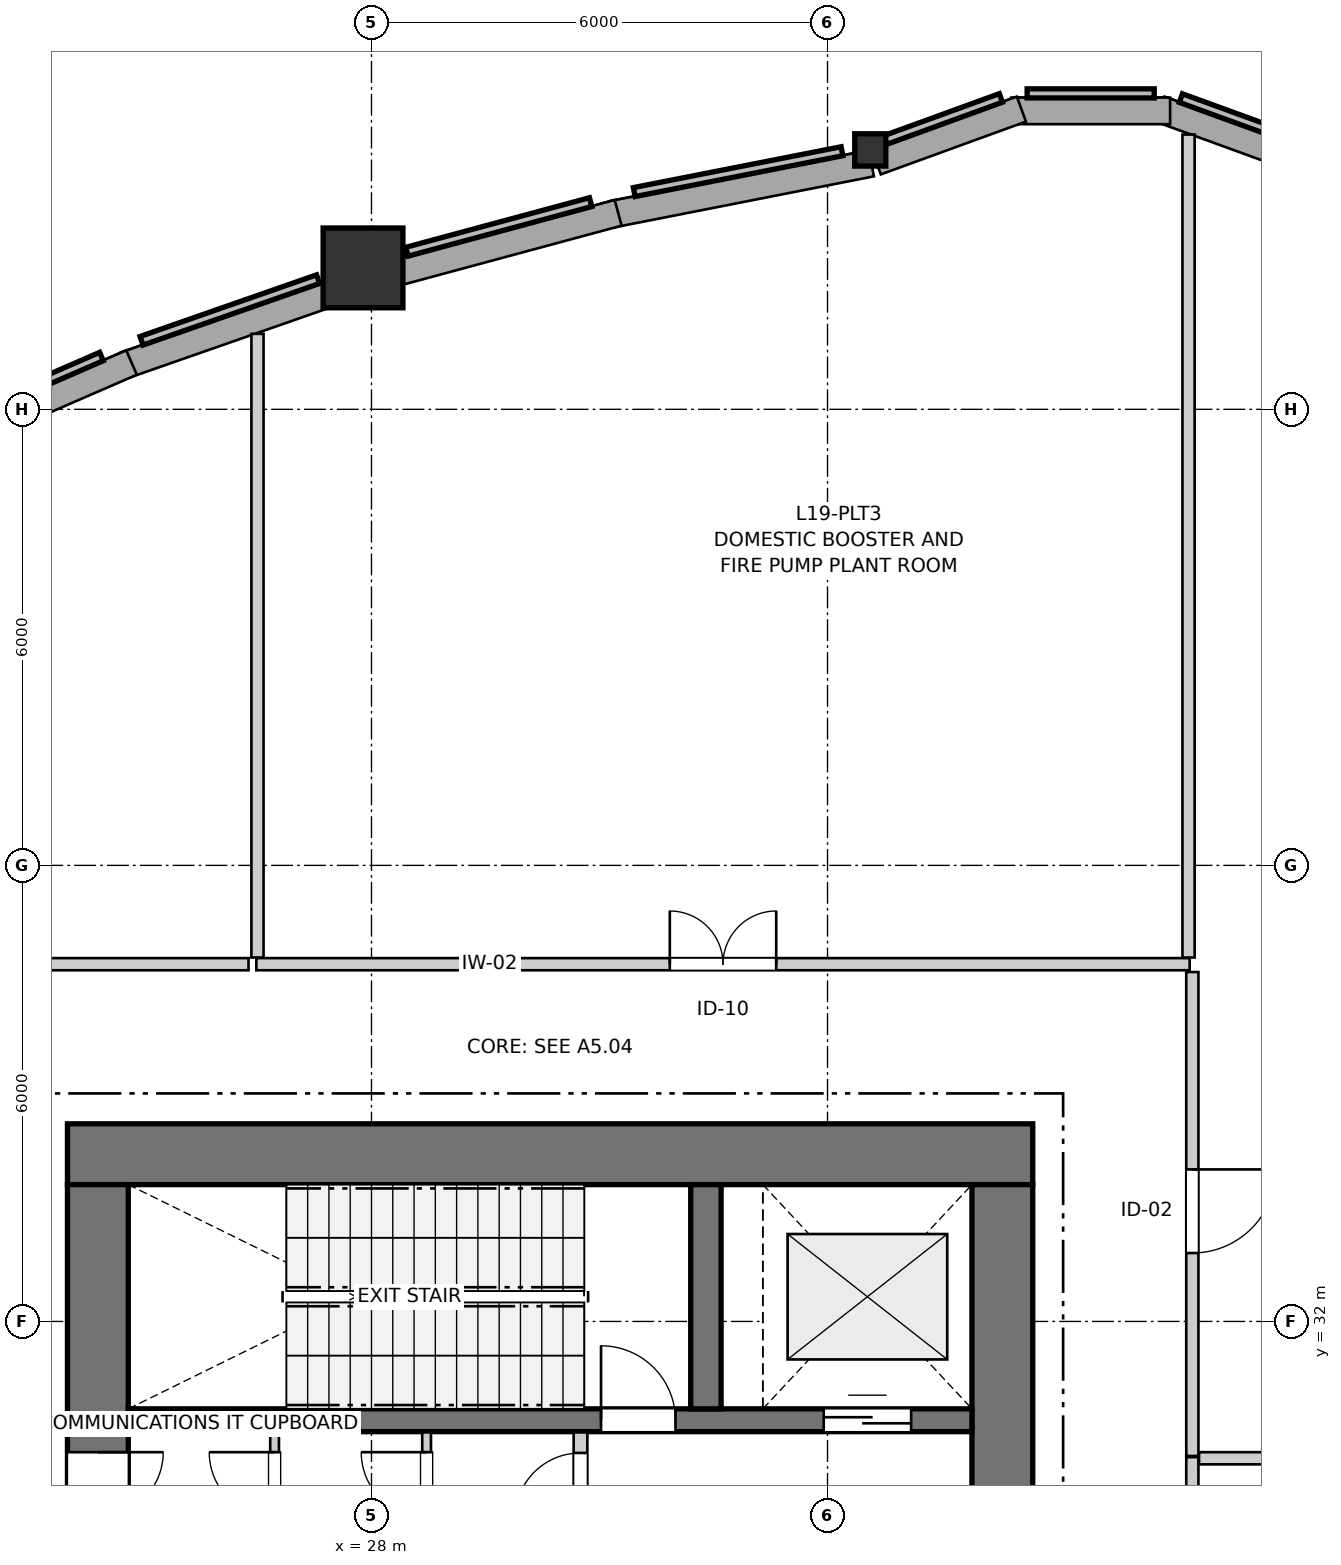
"""IFC4 building model, lengths in metres.
Left out: names, types, materials, properties, quantities, classifications, styles, units other than length and angle.
Written with IfcOpenShell. Run it as: python <this file> out.ifc"""

import sys

from ifc_helpers import new_model, si_unit, direction, frame, frame_2d, origin, origin_2d, place, context, subcontext, project, spatial, rectangle, i_section, extrude, source, transform, mapped, element, fill, save


model = new_model("IFC4")
c1 = context("Model", 3, precision=1e-05, world=origin(), true_north=direction((0.0, 1.0)))
c2 = subcontext(c1, "Body", "Model", "MODEL_VIEW")
j1 = project(units=[si_unit("LENGTHUNIT", "METRE"), si_unit("PLANEANGLEUNIT", "RADIAN")], contexts=[c1])
p1 = place(None, origin())
s1 = spatial("IfcSite", under=j1, at=p1, CompositionType="ELEMENT")
p2 = place(p1, origin())
s2 = spatial("IfcBuilding", under=s1, at=p2, CompositionType="ELEMENT")
p3 = place(p2, frame((0.0, 0.0, 65.4)))
s3 = spatial("IfcBuildingStorey", under=s2, at=p3, CompositionType="ELEMENT", Elevation=65.4)
p4 = place(p3, frame((36.7, 34.2, 0.0), z_axis=(0.0, 0.0, 1.0), x_axis=(-1.0, 0.0, 0.0)))
e1 = element("IfcWall", 1, at=p4, inside=s3, PredefinedType="SHEAR", context=c2, shape_type="SweptSolid", body=[
    extrude(rectangle(XDim=12.7, YDim=0.8, at=frame_2d((6.35, 0.0))), origin(), (0.0, 0.0, 1.0), 4.75),
])
p5 = place(p3, frame((24.4, 33.8, 0.0), z_axis=(0.0, 0.0, 1.0), x_axis=(0.0, -1.0, 0.0)))
e2 = element("IfcWall", 2, at=p5, inside=s3, PredefinedType="SHEAR", context=c2, shape_type="SweptSolid", body=[
    extrude(rectangle(XDim=15.6, YDim=0.8, at=frame_2d((7.8, 0.0))), origin(), (0.0, 0.0, 1.0), 4.75),
])
p6 = place(p5, frame((7.05, 0.0, 0.0)))
e3 = element("IfcOpeningElement", 3, at=p6, cuts=e2, PredefinedType="OPENING", context=c2, shape_type="SweptSolid", body=[
    extrude(rectangle(XDim=1.5, YDim=2.15, at=frame_2d((0.75, 1.075))), frame((0.0, 0.41, 0.0), z_axis=(0.0, -1.0, 0.0), x_axis=(1.0, 0.0, 0.0)), (0.0, 0.0, 1.0), 0.82),
])
p7 = place(p5, frame((3.52, 0.0, 0.0)))
e4 = element("IfcOpeningElement", 4, at=p7, cuts=e2, PredefinedType="OPENING", context=c2, shape_type="SweptSolid", body=[
    extrude(rectangle(XDim=0.86, YDim=2.05, at=frame_2d((0.43, 1.025))), frame((0.0, 0.41, 0.0), z_axis=(0.0, -1.0, 0.0), x_axis=(1.0, 0.0, 0.0)), (0.0, 0.0, 1.0), 0.82),
])
p8 = place(p5, frame((11.22, 0.0, 0.0)))
e5 = element("IfcOpeningElement", 5, at=p8, cuts=e2, PredefinedType="OPENING", context=c2, shape_type="SweptSolid", body=[
    extrude(rectangle(XDim=0.86, YDim=2.05, at=frame_2d((0.43, 1.025))), frame((0.0, 0.41, 0.0), z_axis=(0.0, -1.0, 0.0), x_axis=(1.0, 0.0, 0.0)), (0.0, 0.0, 1.0), 0.82),
])
p9 = place(p3, frame((36.3, 18.2, 0.0), z_axis=(0.0, 0.0, 1.0), x_axis=(0.0, 1.0, 0.0)))
e6 = element("IfcWall", 6, at=p9, inside=s3, PredefinedType="SHEAR", context=c2, shape_type="SweptSolid", body=[
    extrude(rectangle(XDim=15.6, YDim=0.8, at=frame_2d((7.8, 0.0))), origin(), (0.0, 0.0, 1.0), 4.75),
])
p10 = place(p9, frame((4.25, 0.0, 0.0)))
e7 = element("IfcOpeningElement", 7, at=p10, cuts=e6, PredefinedType="OPENING", context=c2, shape_type="SweptSolid", body=[
    extrude(rectangle(XDim=1.1, YDim=2.15, at=frame_2d((0.55, 1.075))), frame((0.0, 0.41, 0.0), z_axis=(0.0, -1.0, 0.0), x_axis=(1.0, 0.0, 0.0)), (0.0, 0.0, 1.0), 0.82),
])
p11 = place(p9, frame((10.25, 0.0, 0.0)))
e8 = element("IfcOpeningElement", 8, at=p11, cuts=e6, PredefinedType="OPENING", context=c2, shape_type="SweptSolid", body=[
    extrude(rectangle(XDim=1.1, YDim=2.15, at=frame_2d((0.55, 1.075))), frame((0.0, 0.41, 0.0), z_axis=(0.0, -1.0, 0.0), x_axis=(1.0, 0.0, 0.0)), (0.0, 0.0, 1.0), 0.82),
])
p12 = place(p3, frame((24.8, 30.7, 0.0), z_axis=(0.0, 0.0, 1.0), x_axis=(1.0, 0.0, 0.0)))
e9 = element("IfcWall", 9, at=p12, inside=s3, PredefinedType="SHEAR", context=c2, shape_type="SweptSolid", body=[
    extrude(rectangle(XDim=11.1, YDim=0.3, at=frame_2d((5.55, 0.0))), origin(), (0.0, 0.0, 1.0), 4.75),
])
p13 = place(p12, frame((6.22, 0.0, 0.0)))
e10 = element("IfcOpeningElement", 10, at=p13, cuts=e9, PredefinedType="OPENING", context=c2, shape_type="SweptSolid", body=[
    extrude(rectangle(XDim=0.98, YDim=2.15, at=frame_2d((0.49, 1.075))), frame((0.0, 0.16, 0.0), z_axis=(0.0, -1.0, 0.0), x_axis=(1.0, 0.0, 0.0)), (0.0, 0.0, 1.0), 0.32),
])
p14 = place(p12, frame((9.15, 0.0, 0.0)))
e11 = element("IfcOpeningElement", 11, at=p14, cuts=e9, PredefinedType="OPENING", context=c2, shape_type="SweptSolid", body=[
    extrude(rectangle(XDim=1.15, YDim=2.15, at=frame_2d((0.575, 1.075))), frame((0.0, 0.16, 0.0), z_axis=(0.0, -1.0, 0.0), x_axis=(1.0, 0.0, 0.0)), (0.0, 0.0, 1.0), 0.32),
])
p15 = place(p3, frame((32.4, 30.85, 0.0), z_axis=(0.0, 0.0, 1.0), x_axis=(0.0, 1.0, 0.0)))
e12 = element("IfcWall", 12, at=p15, inside=s3, PredefinedType="SHEAR", context=c2, shape_type="SweptSolid", body=[
    extrude(rectangle(XDim=2.95, YDim=0.4, at=frame_2d((1.475, 0.0))), origin(), (0.0, 0.0, 1.0), 4.75),
])
m1 = source(origin(), c2, "Body", "SweptSolid", [
    extrude(i_section(OverallWidth=0.409, OverallDepth=0.425, WebThickness=0.03, FlangeThickness=0.048, FilletRadius=0.015, at=origin_2d()), origin(), (0.0, 0.0, 1.0), 4.75),
])
p16 = place(p3, frame((34.562, 47.413, 0.0), z_axis=(0.0, 0.0, 1.0), x_axis=(1.0, 0.0, 0.0)))
e13 = element("IfcColumn", 13, at=p16, inside=s3, PredefinedType="PILASTER", context=c2, shape_type="MappedRepresentation", body=[
    mapped(m1, transform((0.0, 0.0, 0.0), x_axis=(1.0, 0.0, 0.0), y_axis=(0.0, 1.0, 0.0), z_axis=(0.0, 0.0, 1.0), scale=1.0)),
])
m2 = source(origin(), c2, "Body", "SweptSolid", [
    extrude(rectangle(XDim=1.05, YDim=1.05, at=origin_2d()), origin(), (0.0, 0.0, 1.0), 4.75),
])
p17 = place(p3, frame((27.888, 45.861, 0.0), z_axis=(0.0, 0.0, 1.0), x_axis=(1.0, 0.0, 0.0)))
e14 = element("IfcColumn", 14, at=p17, inside=s3, PredefinedType="COLUMN", context=c2, shape_type="MappedRepresentation", body=[
    mapped(m2, transform((0.0, 0.0, 0.0), x_axis=(1.0, 0.0, 0.0), y_axis=(0.0, 1.0, 0.0), z_axis=(0.0, 0.0, 1.0), scale=1.0)),
])
p18 = place(p3, frame((40.338, 47.235, 0.0), z_axis=(0.0, 0.0, 1.0), x_axis=(-0.939711556618, 0.341968113072, 0.0)))
e15 = element("IfcWall", 15, at=p18, inside=s3, PredefinedType="SOLIDWALL", context=c2, shape_type="SweptSolid", body=[
    extrude(rectangle(XDim=2.09, YDim=0.35, at=frame_2d((1.045, 0.0))), origin(), (0.0, 0.0, 1.0), 4.23),
])
p19 = place(p3, frame((38.508, 47.927, 0.0), z_axis=(0.0, 0.0, 1.0), x_axis=(-1.0, 0.0, 0.0)))
e16 = element("IfcWall", 16, at=p19, inside=s3, PredefinedType="SOLIDWALL", context=c2, shape_type="SweptSolid", body=[
    extrude(rectangle(XDim=2.091, YDim=0.35, at=frame_2d((1.045, 0.0))), origin(), (0.0, 0.0, 1.0), 4.23),
])
p20 = place(p3, frame((36.551, 47.95, 0.0), z_axis=(0.0, 0.0, 1.0), x_axis=(-0.939691662178, -0.342022777067, 0.0)))
e17 = element("IfcWall", 17, at=p20, inside=s3, PredefinedType="SOLIDWALL", context=c2, shape_type="SweptSolid", body=[
    extrude(rectangle(XDim=2.032, YDim=0.35, at=frame_2d((1.016, 0.0))), origin(), (0.0, 0.0, 1.0), 4.23),
])
p21 = place(p3, frame((34.577, 47.237, 0.0), z_axis=(0.0, 0.0, 1.0), x_axis=(-0.981238400755, -0.192798342532, 0.0)))
e18 = element("IfcWall", 18, at=p21, inside=s3, PredefinedType="SOLIDWALL", context=c2, shape_type="SweptSolid", body=[
    extrude(rectangle(XDim=3.482, YDim=0.35, at=frame_2d((1.741, 0.0))), origin(), (0.0, 0.0, 1.0), 4.23),
])
p22 = place(p3, frame((31.246, 46.585, 0.0), z_axis=(0.0, 0.0, 1.0), x_axis=(-0.965469506164, -0.260516089076, 0.0)))
e19 = element("IfcWall", 19, at=p22, inside=s3, PredefinedType="SOLIDWALL", context=c2, shape_type="SweptSolid", body=[
    extrude(rectangle(XDim=3.13, YDim=0.35, at=frame_2d((1.565, 0.0))), origin(), (0.0, 0.0, 1.0), 4.23),
])
p23 = place(p3, frame((27.663, 45.596, 0.0), z_axis=(0.0, 0.0, 1.0), x_axis=(-0.944134113087, -0.329561491236, 0.0)))
e20 = element("IfcWall", 20, at=p23, inside=s3, PredefinedType="SOLIDWALL", context=c2, shape_type="SweptSolid", body=[
    extrude(rectangle(XDim=3.074, YDim=0.35, at=frame_2d((1.537, 0.0))), origin(), (0.0, 0.0, 1.0), 4.23),
])
p24 = place(p3, frame((24.843, 44.615, 0.0), z_axis=(0.0, 0.0, 1.0), x_axis=(-0.917119193404, -0.398613076918, 0.0)))
e21 = element("IfcWall", 21, at=p24, inside=s3, PredefinedType="SOLIDWALL", context=c2, shape_type="SweptSolid", body=[
    extrude(rectangle(XDim=3.317, YDim=0.35, at=frame_2d((1.659, 0.0))), origin(), (0.0, 0.0, 1.0), 4.23),
])
p25 = place(p3, frame((30.75, 27.43, 0.0), z_axis=(0.0, 0.0, 1.0), x_axis=(0.0, 1.0, 0.0)))
e22 = element("IfcWall", 22, at=p25, inside=s3, PredefinedType="PARTITIONING", context=c2, shape_type="SweptSolid", body=[
    extrude(rectangle(XDim=3.11, YDim=0.18, at=frame_2d((1.555, 0.0))), origin(), (0.0, 0.0, 1.0), 4.75),
])
p26 = place(p25, frame((1.98, 0.0, 0.0)))
e23 = element("IfcOpeningElement", 23, at=p26, cuts=e22, PredefinedType="OPENING", context=c2, shape_type="SweptSolid", body=[
    extrude(rectangle(XDim=0.86, YDim=2.05, at=frame_2d((0.43, 1.025))), frame((0.0, 0.1, 0.0), z_axis=(0.0, -1.0, 0.0), x_axis=(1.0, 0.0, 0.0)), (0.0, 0.0, 1.0), 0.2),
])
p27 = place(p3, frame((26.725, 29.16, 0.0), z_axis=(0.0, 0.0, 1.0), x_axis=(0.0, 1.0, 0.0)))
e24 = element("IfcWall", 24, at=p27, inside=s3, PredefinedType="PARTITIONING", context=c2, shape_type="SweptSolid", body=[
    extrude(rectangle(XDim=1.38, YDim=0.115, at=frame_2d((0.69, 0.0))), origin(), (0.0, 0.0, 1.0), 4.75),
])
p28 = place(p27, frame((0.26, 0.0, 0.0)))
e25 = element("IfcOpeningElement", 25, at=p28, cuts=e24, PredefinedType="OPENING", context=c2, shape_type="SweptSolid", body=[
    extrude(rectangle(XDim=0.86, YDim=2.05, at=frame_2d((0.43, 1.025))), frame((0.0, 0.067, 0.0), z_axis=(0.0, -1.0, 0.0), x_axis=(1.0, 0.0, 0.0)), (0.0, 0.0, 1.0), 0.135),
])
p29 = place(p3, frame((28.725, 29.16, 0.0), z_axis=(0.0, 0.0, 1.0), x_axis=(0.0, 1.0, 0.0)))
e26 = element("IfcWall", 26, at=p29, inside=s3, PredefinedType="PARTITIONING", context=c2, shape_type="SweptSolid", body=[
    extrude(rectangle(XDim=1.38, YDim=0.115, at=frame_2d((0.69, 0.0))), origin(), (0.0, 0.0, 1.0), 4.75),
])
p30 = place(p29, frame((0.26, 0.0, 0.0)))
e27 = element("IfcOpeningElement", 27, at=p30, cuts=e26, PredefinedType="OPENING", context=c2, shape_type="SweptSolid", body=[
    extrude(rectangle(XDim=0.86, YDim=2.05, at=frame_2d((0.43, 1.025))), frame((0.0, 0.067, 0.0), z_axis=(0.0, -1.0, 0.0), x_axis=(1.0, 0.0, 0.0)), (0.0, 0.0, 1.0), 0.135),
])
p31 = place(p3, frame((26.485, 36.7, 0.0), z_axis=(0.0, 0.0, 1.0), x_axis=(1.0, 0.0, 0.0)))
e28 = element("IfcWall", 28, at=p31, inside=s3, PredefinedType="PARTITIONING", context=c2, shape_type="SweptSolid", body=[
    extrude(rectangle(XDim=12.28, YDim=0.16, at=frame_2d((6.14, 0.0))), origin(), (0.0, 0.0, 1.0), 4.218),
])
p32 = place(p31, frame((5.44, 0.0, 0.0)))
e29 = element("IfcOpeningElement", 29, at=p32, cuts=e28, PredefinedType="OPENING", context=c2, shape_type="SweptSolid", body=[
    extrude(rectangle(XDim=1.4, YDim=2.15, at=frame_2d((0.7, 1.075))), frame((0.0, 0.09, 0.0), z_axis=(0.0, -1.0, 0.0), x_axis=(1.0, 0.0, 0.0)), (0.0, 0.0, 1.0), 0.18),
])
p33 = place(p3, frame((38.8, 30.215, 0.0), z_axis=(0.0, 0.0, 1.0), x_axis=(0.0, -1.0, 0.0)))
e30 = element("IfcWall", 30, at=p33, inside=s3, PredefinedType="PARTITIONING", context=c2, shape_type="SweptSolid", body=[
    extrude(rectangle(XDim=8.43, YDim=0.16, at=frame_2d((4.215, 0.0))), origin(), (0.0, 0.0, 1.0), 4.75),
])
p34 = place(p33, frame((3.515, 0.0, 0.0)))
e31 = element("IfcOpeningElement", 31, at=p34, cuts=e30, PredefinedType="OPENING", context=c2, shape_type="SweptSolid", body=[
    extrude(rectangle(XDim=1.4, YDim=2.15, at=frame_2d((0.7, 1.075))), frame((0.0, 0.09, 0.0), z_axis=(0.0, -1.0, 0.0), x_axis=(1.0, 0.0, 0.0)), (0.0, 0.0, 1.0), 0.18),
])
p35 = place(p3, frame((38.8, 36.597, 0.0), z_axis=(0.0, 0.0, 1.0), x_axis=(0.0, -1.0, 0.0)))
e32 = element("IfcWall", 32, at=p35, inside=s3, PredefinedType="PARTITIONING", context=c2, shape_type="SweptSolid", body=[
    extrude(rectangle(XDim=6.367, YDim=0.16, at=frame_2d((3.184, 0.0))), origin(), (0.0, 0.0, 1.0), 4.218),
])
p36 = place(p35, frame((2.597, 0.0, 0.0)))
e33 = element("IfcOpeningElement", 33, at=p36, cuts=e32, PredefinedType="OPENING", context=c2, shape_type="SweptSolid", body=[
    extrude(rectangle(XDim=1.1, YDim=2.15, at=frame_2d((0.55, 1.075))), frame((0.0, 0.09, 0.0), z_axis=(0.0, -1.0, 0.0), x_axis=(1.0, 0.0, 0.0)), (0.0, 0.0, 1.0), 0.18),
])
p37 = place(p3, frame((38.75, 36.788, 0.0), z_axis=(0.0, 0.0, 1.0), x_axis=(0.0, 1.0, 0.0)))
e34 = element("IfcWall", 34, at=p37, inside=s3, PredefinedType="PARTITIONING", context=c2, shape_type="SweptSolid", body=[
    extrude(rectangle(XDim=10.827, YDim=0.16, at=frame_2d((5.414, 0.0))), origin(), (0.0, 0.0, 1.0), 4.75),
])
p38 = place(p3, frame((26.5, 36.788, 0.0), z_axis=(0.0, 0.0, 1.0), x_axis=(0.0, 1.0, 0.0)))
e35 = element("IfcWall", 35, at=p38, inside=s3, PredefinedType="PARTITIONING", context=c2, shape_type="SweptSolid", body=[
    extrude(rectangle(XDim=8.205, YDim=0.16, at=frame_2d((4.103, 0.0))), origin(), (0.0, 0.0, 1.0), 4.75),
])
p39 = place(p3, frame((38.888, 30.2, 0.0), z_axis=(0.0, 0.0, 1.0), x_axis=(1.0, 0.0, 0.0)))
e36 = element("IfcWall", 36, at=p39, inside=s3, PredefinedType="PARTITIONING", context=c2, shape_type="SweptSolid", body=[
    extrude(rectangle(XDim=6.889, YDim=0.16, at=frame_2d((3.445, 0.0))), origin(), (0.0, 0.0, 1.0), 4.75),
])
p40 = place(p3, frame((21.988, 36.7, 0.0), z_axis=(0.0, 0.0, 1.0), x_axis=(1.0, 0.0, 0.0)))
e37 = element("IfcWall", 37, at=p40, inside=s3, PredefinedType="PARTITIONING", context=c2, shape_type="SweptSolid", body=[
    extrude(rectangle(XDim=4.394, YDim=0.16, at=frame_2d((2.197, 0.0))), origin(), (0.0, 0.0, 1.0), 4.218),
])
m3 = source(origin(), c2, "Body", "SweptSolid", [
    extrude(rectangle(XDim=0.98, YDim=2.15, at=frame_2d((0.49, 1.075))), frame((0.0, 0.025, 0.0), z_axis=(0.0, -1.0, 0.0), x_axis=(1.0, 0.0, 0.0)), (0.0, 0.0, 1.0), 0.05),
])
p41 = place(p13, origin())
e38 = element("IfcDoor", 38, at=p41, inside=s3, OperationType="SINGLE_SWING_LEFT", PredefinedType="DOOR", context=c2, shape_type="MappedRepresentation", body=[
    mapped(m3, transform((0.0, 0.0, 0.0), x_axis=(1.0, 0.0, 0.0), y_axis=(0.0, 1.0, 0.0), z_axis=(0.0, 0.0, 1.0), scale=1.0)),
])
fill(e10, e38)
m4 = source(origin(), c2, "Body", "SweptSolid", [
    extrude(rectangle(XDim=1.15, YDim=2.15, at=frame_2d((0.575, 1.075))), frame((0.0, 0.025, 0.0), z_axis=(0.0, -1.0, 0.0), x_axis=(1.0, 0.0, 0.0)), (0.0, 0.0, 1.0), 0.05),
])
p42 = place(p14, origin())
e39 = element("IfcDoor", 39, at=p42, inside=s3, OperationType="DOUBLE_DOOR_SLIDING", PredefinedType="DOOR", context=c2, shape_type="MappedRepresentation", body=[
    mapped(m4, transform((0.0, 0.0, 0.0), x_axis=(1.0, 0.0, 0.0), y_axis=(0.0, 1.0, 0.0), z_axis=(0.0, 0.0, 1.0), scale=1.0)),
])
fill(e11, e39)
m5 = source(origin(), c2, "Body", "SweptSolid", [
    extrude(rectangle(XDim=0.86, YDim=2.05, at=frame_2d((0.43, 1.025))), frame((0.0, 0.025, 0.0), z_axis=(0.0, -1.0, 0.0), x_axis=(1.0, 0.0, 0.0)), (0.0, 0.0, 1.0), 0.05),
])
p43 = place(p7, origin())
e40 = element("IfcDoor", 40, at=p43, inside=s3, OperationType="SINGLE_SWING_LEFT", PredefinedType="DOOR", context=c2, shape_type="MappedRepresentation", body=[
    mapped(m5, transform((0.0, 0.0, 0.0), x_axis=(1.0, 0.0, 0.0), y_axis=(0.0, 1.0, 0.0), z_axis=(0.0, 0.0, 1.0), scale=1.0)),
])
fill(e4, e40)
p44 = place(p26, origin())
e41 = element("IfcDoor", 41, at=p44, inside=s3, OperationType="SINGLE_SWING_LEFT", PredefinedType="DOOR", context=c2, shape_type="MappedRepresentation", body=[
    mapped(m5, transform((0.0, 0.0, 0.0), x_axis=(1.0, 0.0, 0.0), y_axis=(0.0, 1.0, 0.0), z_axis=(0.0, 0.0, 1.0), scale=1.0)),
])
fill(e23, e41)
p45 = place(p28, origin())
e42 = element("IfcDoor", 42, at=p45, inside=s3, OperationType="SINGLE_SWING_RIGHT", PredefinedType="DOOR", context=c2, shape_type="MappedRepresentation", body=[
    mapped(m5, transform((0.0, 0.0, 0.0), x_axis=(1.0, 0.0, 0.0), y_axis=(0.0, 1.0, 0.0), z_axis=(0.0, 0.0, 1.0), scale=1.0)),
])
fill(e25, e42)
p46 = place(p30, origin())
e43 = element("IfcDoor", 43, at=p46, inside=s3, OperationType="SINGLE_SWING_RIGHT", PredefinedType="DOOR", context=c2, shape_type="MappedRepresentation", body=[
    mapped(m5, transform((0.0, 0.0, 0.0), x_axis=(1.0, 0.0, 0.0), y_axis=(0.0, 1.0, 0.0), z_axis=(0.0, 0.0, 1.0), scale=1.0)),
])
fill(e27, e43)
m6 = source(origin(), c2, "Body", "SweptSolid", [
    extrude(rectangle(XDim=1.4, YDim=2.15, at=frame_2d((0.7, 1.075))), frame((0.0, 0.025, 0.0), z_axis=(0.0, -1.0, 0.0), x_axis=(1.0, 0.0, 0.0)), (0.0, 0.0, 1.0), 0.05),
])
p47 = place(p32, origin())
e44 = element("IfcDoor", 44, at=p47, inside=s3, OperationType="DOUBLE_DOOR_SINGLE_SWING", PredefinedType="DOOR", context=c2, shape_type="MappedRepresentation", body=[
    mapped(m6, transform((0.0, 0.0, 0.0), x_axis=(1.0, 0.0, 0.0), y_axis=(0.0, 1.0, 0.0), z_axis=(0.0, 0.0, 1.0), scale=1.0)),
])
fill(e29, e44)
m7 = source(origin(), c2, "Body", "SweptSolid", [
    extrude(rectangle(XDim=1.1, YDim=2.15, at=frame_2d((0.55, 1.075))), frame((0.0, 0.025, 0.0), z_axis=(0.0, -1.0, 0.0), x_axis=(1.0, 0.0, 0.0)), (0.0, 0.0, 1.0), 0.05),
])
p48 = place(p36, origin())
e45 = element("IfcDoor", 45, at=p48, inside=s3, OperationType="SINGLE_SWING_LEFT", PredefinedType="DOOR", context=c2, shape_type="MappedRepresentation", body=[
    mapped(m7, transform((0.0, 0.0, 0.0), x_axis=(1.0, 0.0, 0.0), y_axis=(0.0, 1.0, 0.0), z_axis=(0.0, 0.0, 1.0), scale=1.0)),
])
fill(e33, e45)
save(model, sys.argv[1])
